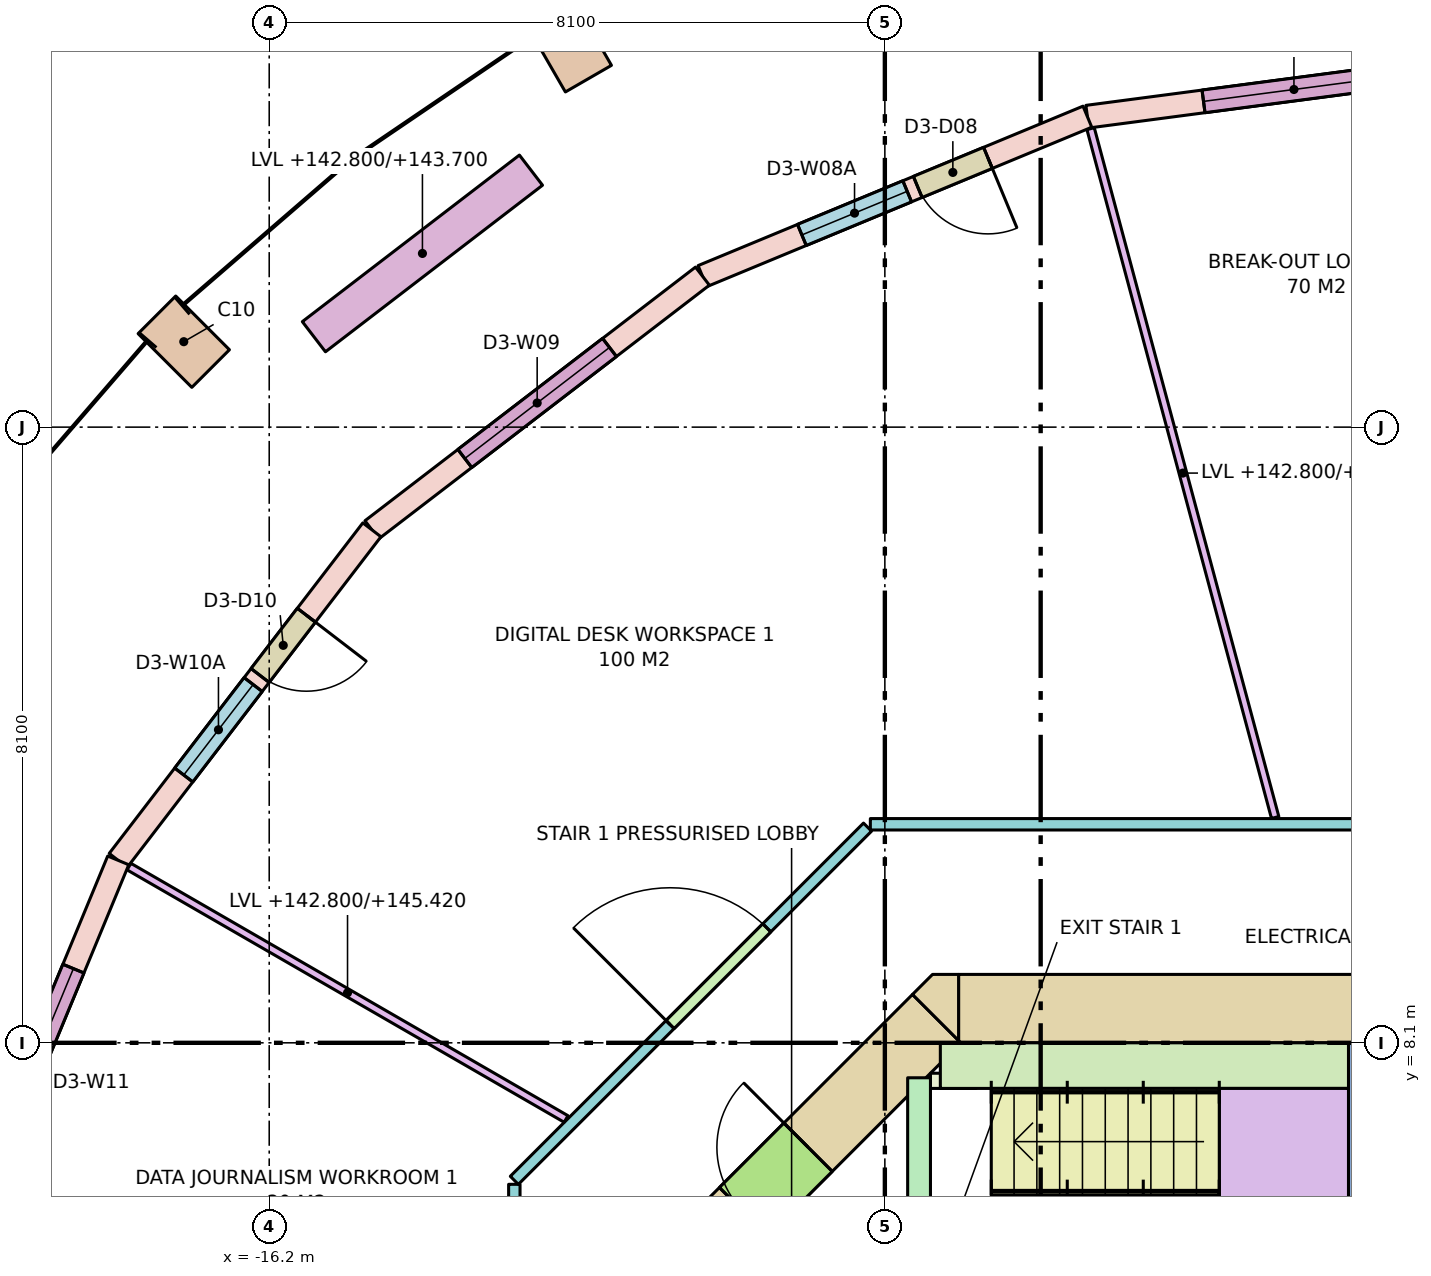
"""IFC4 building model, lengths in metres.
Left out: names, types, materials, properties, quantities, classifications, styles, units other than length and angle.
Written with IfcOpenShell. Run it as: python <this file> out.ifc"""

import sys

from ifc_helpers import new_model, si_unit, direction, frame, frame_2d, origin, origin_2d, place, context, subcontext, project, spatial, polyline, rectangle, outline, extrude, element, fill, save


model = new_model("IFC4")
c1 = context("Model", 3, precision=1e-05, world=origin(), true_north=direction((0.0, 1.0)))
c2 = subcontext(c1, "Body", "Model", "MODEL_VIEW")
j1 = project(units=[si_unit("LENGTHUNIT", "METRE"), si_unit("PLANEANGLEUNIT", "RADIAN")], contexts=[c1])
p1 = place(None, origin())
s1 = spatial("IfcSite", under=j1, at=p1, CompositionType="ELEMENT")
p2 = place(p1, origin())
s2 = spatial("IfcBuilding", under=s1, at=p2, CompositionType="ELEMENT")
p3 = place(p2, frame((0.0, 0.0, 142.8)))
s3 = spatial("IfcBuildingStorey", under=s2, at=p3, CompositionType="ELEMENT", Elevation=142.8)
for number, where, z_axis, x_axis in (
    (1, (-12.25, 21.218, 0.0), (0.0, 0.0, 1.0), (-0.866, -0.5, 0.0)),
    (2, (-17.324, 17.324, 0.0), (0.0, 0.0, 1.0), (-0.707, -0.707, 0.0)),
):
    element("IfcColumn", number, at=place(p3, frame(where, z_axis=z_axis, x_axis=x_axis)), inside=s3, PredefinedType="COLUMN", context=c2, shape_type="SweptSolid", body=[
        extrude(rectangle(XDim=0.7, YDim=1.0, at=origin_2d()), origin(), (0.0, 0.0, 1.0), 3.8),
    ])
p4 = place(p3, frame((-7.13, 8.55, -0.28), z_axis=(0.0, 0.0, 1.0), x_axis=(1.0, 0.0, 0.0)))
e3 = element("IfcWall", 3, at=p4, inside=s3, PredefinedType="SHEAR", context=c2, shape_type="SweptSolid", body=[
    extrude(rectangle(XDim=14.26, YDim=0.9, at=frame_2d((7.13, 0.0))), origin(), (0.0, 0.0, 1.0), 3.8),
])
p5 = place(p4, frame((5.48, 0.0, 0.28)))
e4 = element("IfcOpeningElement", 4, at=p5, cuts=e3, PredefinedType="OPENING", context=c2, shape_type="SweptSolid", body=[
    extrude(rectangle(XDim=0.7, YDim=2.1, at=frame_2d((0.35, 1.05))), frame((0.0, 0.46, 0.0), z_axis=(0.0, -1.0, 0.0), x_axis=(1.0, 0.0, 0.0)), (0.0, 0.0, 1.0), 0.92),
])
p6 = place(p4, frame((7.155, 0.0, 0.28)))
e5 = element("IfcOpeningElement", 5, at=p6, cuts=e3, PredefinedType="OPENING", context=c2, shape_type="SweptSolid", body=[
    extrude(rectangle(XDim=0.9, YDim=2.1, at=frame_2d((0.45, 1.05))), frame((0.0, 0.46, 0.0), z_axis=(0.0, -1.0, 0.0), x_axis=(1.0, 0.0, 0.0)), (0.0, 0.0, 1.0), 0.92),
])
p7 = place(p3, frame((-10.418, 5.418, -0.28), z_axis=(0.0, 0.0, 1.0), x_axis=(0.707106781187, 0.707106781187, 0.0)))
e6 = element("IfcWall", 6, at=p7, inside=s3, PredefinedType="SHEAR", context=c2, shape_type="SweptSolid", body=[
    extrude(rectangle(XDim=4.243, YDim=0.9, at=frame_2d((2.121, 0.0))), origin(), (0.0, 0.0, 1.0), 3.8),
])
p8 = place(p7, frame((0.65, 0.0, 0.28)))
e7 = element("IfcOpeningElement", 7, at=p8, cuts=e6, PredefinedType="OPENING", context=c2, shape_type="SweptSolid", body=[
    extrude(rectangle(XDim=1.2, YDim=2.1, at=frame_2d((0.6, 1.05))), frame((0.0, 0.46, 0.0), z_axis=(0.0, -1.0, 0.0), x_axis=(1.0, 0.0, 0.0)), (0.0, 0.0, 1.0), 0.92),
])
p9 = place(p3, frame((0.0, 0.0, -0.28)))
e8 = element("IfcWall", 8, at=p9, inside=s3, PredefinedType="SHEAR", context=c2, shape_type="SweptSolid", body=[
    extrude(outline(polyline([(-7.473, 9.0), (-7.13, 9.0), (-7.13, 8.13), (-7.736, 8.736), (-7.473, 9.0)])), origin(), (0.0, 0.0, 1.0), 3.8),
])
p10 = place(p3, frame((-1.85, 1.5, 0.0), z_axis=(0.0, 0.0, 1.0), x_axis=(0.0, 1.0, 0.0)))
e9 = element("IfcWall", 9, at=p10, inside=s3, PredefinedType="SHEAR", context=c2, shape_type="SweptSolid", body=[
    extrude(rectangle(XDim=6.6, YDim=0.3, at=frame_2d((3.3, 0.0))), origin(), (0.0, 0.0, 1.0), 3.52),
])
p11 = place(p3, frame((-7.65, 4.5, 0.0), z_axis=(0.0, 0.0, 1.0), x_axis=(0.0, 1.0, 0.0)))
e10 = element("IfcWall", 10, at=p11, inside=s3, PredefinedType="SHEAR", context=c2, shape_type="SweptSolid", body=[
    extrude(rectangle(XDim=3.14, YDim=0.3, at=frame_2d((1.57, 0.0))), origin(), (0.0, 0.0, 1.0), 3.52),
])
p12 = place(p11, frame((0.14, 0.0, 0.0)))
e11 = element("IfcOpeningElement", 11, at=p12, cuts=e10, PredefinedType="OPENING", context=c2, shape_type="SweptSolid", body=[
    extrude(rectangle(XDim=1.32, YDim=2.1, at=frame_2d((0.66, 1.05))), frame((0.0, 0.16, 0.0), z_axis=(0.0, -1.0, 0.0), x_axis=(1.0, 0.0, 0.0)), (0.0, 0.0, 1.0), 0.32),
])
p13 = place(p3, frame((-7.37, 7.8, 0.0), z_axis=(0.0, 0.0, 1.0), x_axis=(1.0, 0.0, 0.0)))
e12 = element("IfcWall", 12, at=p13, inside=s3, PredefinedType="SHEAR", context=c2, shape_type="SweptSolid", body=[
    extrude(rectangle(XDim=5.37, YDim=0.6, at=frame_2d((2.685, 0.0))), origin(), (0.0, 0.0, 1.0), 3.52),
])
p14 = place(p3, frame((-7.5, 7.6, 0.0), z_axis=(0.0, 0.0, 1.0), x_axis=(1.0, 0.0, 0.0)))
e13 = element("IfcWall", 13, at=p14, inside=s3, PredefinedType="SHEAR", context=c2, shape_type="SweptSolid", body=[
    extrude(rectangle(XDim=0.6, YDim=0.2, at=frame_2d((0.3, 0.0))), origin(), (0.0, 0.0, 1.0), 3.52),
])
p15 = place(p3, frame((0.0, 21.0, 0.0), z_axis=(0.0, 0.0, 1.0), x_axis=(-0.991444743541, -0.130527087244, 0.0)))
e14 = element("IfcWall", 14, at=p15, inside=s3, PredefinedType="STANDARD", context=c2, shape_type="SweptSolid", body=[
    extrude(rectangle(XDim=5.482, YDim=0.3, at=frame_2d((2.741, 0.0))), origin(), (0.0, 0.0, 1.0), 3.52),
])
p16 = place(p15, frame((1.541, 0.0, 0.8)))
e15 = element("IfcOpeningElement", 15, at=p16, cuts=e14, PredefinedType="OPENING", context=c2, shape_type="SweptSolid", body=[
    extrude(rectangle(XDim=2.4, YDim=2.5, at=frame_2d((1.2, 1.25))), frame((0.0, 0.16, 0.0), z_axis=(0.0, -1.0, 0.0), x_axis=(1.0, 0.0, 0.0)), (0.0, 0.0, 1.0), 0.32),
])
p17 = place(p3, frame((-5.435, 20.284, 0.0), z_axis=(0.0, 0.0, 1.0), x_axis=(-0.923877333662, -0.382688740813, 0.0)))
e16 = element("IfcWall", 16, at=p17, inside=s3, PredefinedType="STANDARD", context=c2, shape_type="SweptSolid", body=[
    extrude(rectangle(XDim=5.482, YDim=0.3, at=frame_2d((2.741, 0.0))), origin(), (0.0, 0.0, 1.0), 3.52),
])
p18 = place(p17, frame((1.416, 0.0, 0.0)))
e17 = element("IfcOpeningElement", 17, at=p18, cuts=e16, PredefinedType="OPENING", context=c2, shape_type="SweptSolid", body=[
    extrude(rectangle(XDim=1.0, YDim=2.4, at=frame_2d((0.5, 1.2))), frame((0.0, 0.16, 0.0), z_axis=(0.0, -1.0, 0.0), x_axis=(1.0, 0.0, 0.0)), (0.0, 0.0, 1.0), 0.32),
])
p19 = place(p17, frame((2.566, 0.0, 0.8)))
e18 = element("IfcOpeningElement", 18, at=p19, cuts=e16, PredefinedType="OPENING", context=c2, shape_type="SweptSolid", body=[
    extrude(rectangle(XDim=1.5, YDim=2.5, at=frame_2d((0.75, 1.25))), frame((0.0, 0.16, 0.0), z_axis=(0.0, -1.0, 0.0), x_axis=(1.0, 0.0, 0.0)), (0.0, 0.0, 1.0), 0.32),
])
p20 = place(p3, frame((-10.5, 18.187, 0.0), z_axis=(0.0, 0.0, 1.0), x_axis=(-0.793335336593, -0.608784891166, 0.0)))
e19 = element("IfcWall", 19, at=p20, inside=s3, PredefinedType="STANDARD", context=c2, shape_type="SweptSolid", body=[
    extrude(rectangle(XDim=5.482, YDim=0.3, at=frame_2d((2.741, 0.0))), origin(), (0.0, 0.0, 1.0), 3.52),
])
p21 = place(p20, frame((1.541, 0.0, 0.8)))
e20 = element("IfcOpeningElement", 20, at=p21, cuts=e19, PredefinedType="OPENING", context=c2, shape_type="SweptSolid", body=[
    extrude(rectangle(XDim=2.4, YDim=2.5, at=frame_2d((1.2, 1.25))), frame((0.0, 0.16, 0.0), z_axis=(0.0, -1.0, 0.0), x_axis=(1.0, 0.0, 0.0)), (0.0, 0.0, 1.0), 0.32),
])
p22 = place(p3, frame((-14.849, 14.849, 0.0), z_axis=(0.0, 0.0, 1.0), x_axis=(-0.608784891166, -0.793335336593, 0.0)))
e21 = element("IfcWall", 21, at=p22, inside=s3, PredefinedType="STANDARD", context=c2, shape_type="SweptSolid", body=[
    extrude(rectangle(XDim=5.482, YDim=0.3, at=frame_2d((2.741, 0.0))), origin(), (0.0, 0.0, 1.0), 3.52),
])
p23 = place(p22, frame((1.416, 0.0, 0.0)))
e22 = element("IfcOpeningElement", 22, at=p23, cuts=e21, PredefinedType="OPENING", context=c2, shape_type="SweptSolid", body=[
    extrude(rectangle(XDim=1.0, YDim=2.4, at=frame_2d((0.5, 1.2))), frame((0.0, 0.16, 0.0), z_axis=(0.0, -1.0, 0.0), x_axis=(1.0, 0.0, 0.0)), (0.0, 0.0, 1.0), 0.32),
])
p24 = place(p22, frame((2.566, 0.0, 0.8)))
e23 = element("IfcOpeningElement", 23, at=p24, cuts=e21, PredefinedType="OPENING", context=c2, shape_type="SweptSolid", body=[
    extrude(rectangle(XDim=1.5, YDim=2.5, at=frame_2d((0.75, 1.25))), frame((0.0, 0.16, 0.0), z_axis=(0.0, -1.0, 0.0), x_axis=(1.0, 0.0, 0.0)), (0.0, 0.0, 1.0), 0.32),
])
p25 = place(p3, frame((-18.187, 10.5, 0.0), z_axis=(0.0, 0.0, 1.0), x_axis=(-0.382688740813, -0.923877333662, 0.0)))
e24 = element("IfcWall", 24, at=p25, inside=s3, PredefinedType="STANDARD", context=c2, shape_type="SweptSolid", body=[
    extrude(rectangle(XDim=5.482, YDim=0.3, at=frame_2d((2.741, 0.0))), origin(), (0.0, 0.0, 1.0), 3.52),
])
p26 = place(p25, frame((1.541, 0.0, 0.8)))
e25 = element("IfcOpeningElement", 25, at=p26, cuts=e24, PredefinedType="OPENING", context=c2, shape_type="SweptSolid", body=[
    extrude(rectangle(XDim=2.4, YDim=2.5, at=frame_2d((1.2, 1.25))), frame((0.0, 0.16, 0.0), z_axis=(0.0, -1.0, 0.0), x_axis=(1.0, 0.0, 0.0)), (0.0, 0.0, 1.0), 0.32),
])
p27 = place(p3, frame((-12.756, 19.581, 0.0), z_axis=(0.0, 0.0, 1.0), x_axis=(-0.793384730612, -0.608720518162, 0.0)))
e26 = element("IfcWall", 26, at=p27, inside=s3, PredefinedType="PARAPET", context=c2, shape_type="SweptSolid", body=[
    extrude(rectangle(XDim=3.6, YDim=0.5, at=frame_2d((1.8, 0.0))), origin(), (0.0, 0.0, 1.0), 0.9),
])
p28 = place(p3, frame((-12.975, 1.275, 0.0), z_axis=(0.0, 0.0, 1.0), x_axis=(0.0, 1.0, 0.0)))
e27 = element("IfcWall", 27, at=p28, inside=s3, PredefinedType="PARTITIONING", context=c2, shape_type="SweptSolid", body=[
    extrude(rectangle(XDim=4.963, YDim=0.15, at=frame_2d((2.482, 0.0))), origin(), (0.0, 0.0, 1.0), 2.62),
])
p29 = place(p28, frame((3.107, 0.0, 0.0)))
e28 = element("IfcOpeningElement", 28, at=p29, cuts=e27, PredefinedType="OPENING", context=c2, shape_type="SweptSolid", body=[
    extrude(rectangle(XDim=0.9, YDim=2.1, at=frame_2d((0.45, 1.05))), frame((0.0, 0.085, 0.0), z_axis=(0.0, -1.0, 0.0), x_axis=(1.0, 0.0, 0.0)), (0.0, 0.0, 1.0), 0.17),
])
p30 = place(p3, frame((-12.975, 6.291, 0.0), z_axis=(0.0, 0.0, 1.0), x_axis=(0.707125355289, 0.707088206597, 0.0)))
e29 = element("IfcWall", 29, at=p30, inside=s3, PredefinedType="PARTITIONING", context=c2, shape_type="SweptSolid", body=[
    extrude(rectangle(XDim=6.572, YDim=0.15, at=frame_2d((3.286, 0.0))), origin(), (0.0, 0.0, 1.0), 2.62),
])
p31 = place(p30, frame((2.898, 0.0, 0.0)))
e30 = element("IfcOpeningElement", 30, at=p31, cuts=e29, PredefinedType="OPENING", context=c2, shape_type="SweptSolid", body=[
    extrude(rectangle(XDim=1.8, YDim=2.1, at=frame_2d((0.9, 1.05))), frame((0.0, 0.085, 0.0), z_axis=(0.0, -1.0, 0.0), x_axis=(1.0, 0.0, 0.0)), (0.0, 0.0, 1.0), 0.17),
])
p32 = place(p3, frame((-8.291, 10.975, 0.0), z_axis=(0.0, 0.0, 1.0), x_axis=(1.0, 0.0, 0.0)))
e31 = element("IfcWall", 31, at=p32, inside=s3, PredefinedType="PARTITIONING", context=c2, shape_type="SweptSolid", body=[
    extrude(rectangle(XDim=9.99, YDim=0.15, at=frame_2d((4.995, 0.0))), origin(), (0.0, 0.0, 1.0), 2.62),
])
p33 = place(p3, frame((-2.965, 11.064, 0.0), z_axis=(0.0, 0.0, 1.0), x_axis=(-0.258812392192, 0.965927608906, 0.0)))
e32 = element("IfcWall", 32, at=p33, inside=s3, PredefinedType="PARTITIONING", context=c2, shape_type="SweptSolid", body=[
    extrude(rectangle(XDim=9.382, YDim=0.1, at=frame_2d((4.691, 0.0))), origin(), (0.0, 0.0, 1.0), 2.62),
])
p34 = place(p3, frame((-12.294, 7.098, 0.0), z_axis=(0.0, 0.0, 1.0), x_axis=(-0.866010486135, 0.500025837236, 0.0)))
e33 = element("IfcWall", 33, at=p34, inside=s3, PredefinedType="PARTITIONING", context=c2, shape_type="SweptSolid", body=[
    extrude(rectangle(XDim=6.641, YDim=0.1, at=frame_2d((3.32, 0.0))), origin(), (0.0, 0.0, 1.0), 2.62),
])
p35 = place(p16, origin())
e34 = element("IfcWindow", 34, at=p35, inside=s3, PartitioningType="SINGLE_PANEL", PredefinedType="WINDOW", context=c2, shape_type="SweptSolid", body=[
    extrude(rectangle(XDim=2.4, YDim=2.5, at=frame_2d((1.2, 1.25))), frame((0.0, 0.03, 0.0), z_axis=(0.0, -1.0, 0.0), x_axis=(1.0, 0.0, 0.0)), (0.0, 0.0, 1.0), 0.06),
])
fill(e15, e34)
p36 = place(p18, origin())
e35 = element("IfcDoor", 35, at=p36, inside=s3, OperationType="SINGLE_SWING_LEFT", PredefinedType="DOOR", context=c2, shape_type="SweptSolid", body=[
    extrude(rectangle(XDim=1.0, YDim=2.4, at=frame_2d((0.5, 1.2))), frame((0.0, 0.025, 0.0), z_axis=(0.0, -1.0, 0.0), x_axis=(1.0, 0.0, 0.0)), (0.0, 0.0, 1.0), 0.05),
])
fill(e17, e35)
p37 = place(p19, origin())
e36 = element("IfcWindow", 36, at=p37, inside=s3, PartitioningType="SINGLE_PANEL", PredefinedType="WINDOW", context=c2, shape_type="SweptSolid", body=[
    extrude(rectangle(XDim=1.5, YDim=2.5, at=frame_2d((0.75, 1.25))), frame((0.0, 0.03, 0.0), z_axis=(0.0, -1.0, 0.0), x_axis=(1.0, 0.0, 0.0)), (0.0, 0.0, 1.0), 0.06),
])
fill(e18, e36)
p38 = place(p21, origin())
e37 = element("IfcWindow", 37, at=p38, inside=s3, PartitioningType="SINGLE_PANEL", PredefinedType="WINDOW", context=c2, shape_type="SweptSolid", body=[
    extrude(rectangle(XDim=2.4, YDim=2.5, at=frame_2d((1.2, 1.25))), frame((0.0, 0.03, 0.0), z_axis=(0.0, -1.0, 0.0), x_axis=(1.0, 0.0, 0.0)), (0.0, 0.0, 1.0), 0.06),
])
fill(e20, e37)
p39 = place(p23, origin())
e38 = element("IfcDoor", 38, at=p39, inside=s3, OperationType="SINGLE_SWING_LEFT", PredefinedType="DOOR", context=c2, shape_type="SweptSolid", body=[
    extrude(rectangle(XDim=1.0, YDim=2.4, at=frame_2d((0.5, 1.2))), frame((0.0, 0.025, 0.0), z_axis=(0.0, -1.0, 0.0), x_axis=(1.0, 0.0, 0.0)), (0.0, 0.0, 1.0), 0.05),
])
fill(e22, e38)
p40 = place(p24, origin())
e39 = element("IfcWindow", 39, at=p40, inside=s3, PartitioningType="SINGLE_PANEL", PredefinedType="WINDOW", context=c2, shape_type="SweptSolid", body=[
    extrude(rectangle(XDim=1.5, YDim=2.5, at=frame_2d((0.75, 1.25))), frame((0.0, 0.03, 0.0), z_axis=(0.0, -1.0, 0.0), x_axis=(1.0, 0.0, 0.0)), (0.0, 0.0, 1.0), 0.06),
])
fill(e23, e39)
p41 = place(p26, origin())
e40 = element("IfcWindow", 40, at=p41, inside=s3, PartitioningType="SINGLE_PANEL", PredefinedType="WINDOW", context=c2, shape_type="SweptSolid", body=[
    extrude(rectangle(XDim=2.4, YDim=2.5, at=frame_2d((1.2, 1.25))), frame((0.0, 0.03, 0.0), z_axis=(0.0, -1.0, 0.0), x_axis=(1.0, 0.0, 0.0)), (0.0, 0.0, 1.0), 0.06),
])
fill(e25, e40)
p42 = place(p8, origin())
e41 = element("IfcDoor", 41, at=p42, inside=s3, OperationType="SINGLE_SWING_RIGHT", PredefinedType="DOOR", context=c2, shape_type="SweptSolid", body=[
    extrude(rectangle(XDim=1.2, YDim=2.1, at=frame_2d((0.6, 1.05))), frame((0.0, 0.025, 0.0), z_axis=(0.0, -1.0, 0.0), x_axis=(1.0, 0.0, 0.0)), (0.0, 0.0, 1.0), 0.05),
])
fill(e7, e41)
p43 = place(p31, origin())
e42 = element("IfcDoor", 42, at=p43, inside=s3, OperationType="DOUBLE_DOOR_SINGLE_SWING", PredefinedType="DOOR", context=c2, shape_type="SweptSolid", body=[
    extrude(rectangle(XDim=1.8, YDim=2.1, at=frame_2d((0.9, 1.05))), frame((0.0, 0.025, 0.0), z_axis=(0.0, -1.0, 0.0), x_axis=(1.0, 0.0, 0.0)), (0.0, 0.0, 1.0), 0.05),
])
fill(e30, e42)
save(model, sys.argv[1])
